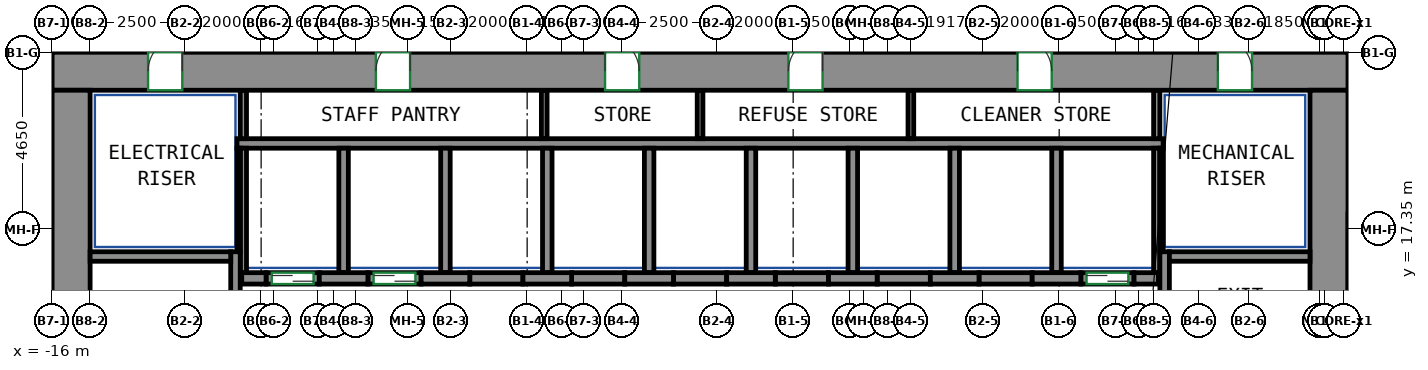
"""IFC4 building model, lengths in metres.
Left out: names, types, materials, properties, quantities, classifications, styles, units other than length and angle.
Written with IfcOpenShell. Run it as: python <this file> out.ifc"""

import sys

from ifc_helpers import new_model, si_unit, direction, frame, frame_2d, origin, place, context, subcontext, project, spatial, rectangle, extrude, source, transform, mapped, element, fill, save


model = new_model("IFC4")
c1 = context("Model", 3, precision=1e-05, world=origin(), true_north=direction((0.0, 1.0)))
c2 = subcontext(c1, "Body", "Model", "MODEL_VIEW")
j1 = project(units=[si_unit("LENGTHUNIT", "METRE"), si_unit("PLANEANGLEUNIT", "RADIAN")], contexts=[c1])
p1 = place(None, origin())
s1 = spatial("IfcSite", under=j1, at=p1, CompositionType="ELEMENT")
p2 = place(p1, origin())
s2 = spatial("IfcBuilding", under=s1, at=p2, CompositionType="ELEMENT")
p3 = place(p2, frame((0.0, 0.0, 43.0)))
s3 = spatial("IfcBuildingStorey", under=s2, at=p3, CompositionType="ELEMENT", Elevation=43.0)
m1 = source(origin(), c2, "Body", "SweptSolid", [
    extrude(rectangle(XDim=34.1, YDim=1.0, at=frame_2d((17.05, 0.0))), origin(), (0.0, 0.0, 1.0), 3.72),
])
p4 = place(p3, frame((-16.0, 21.5, 0.0), z_axis=(0.0, 0.0, 1.0), x_axis=(1.0, 0.0, 0.0)))
e1 = element("IfcWall", 1, at=p4, inside=s3, PredefinedType="SHEAR", context=c2, shape_type="MappedRepresentation", body=[
    mapped(m1, transform((0.0, 0.0, 0.0))),
])
p5 = place(p4, frame((8.52, 0.0, 0.0)))
e2 = element("IfcOpeningElement", 2, at=p5, cuts=e1, PredefinedType="OPENING", context=c2, shape_type="SweptSolid", body=[
    extrude(rectangle(XDim=0.9, YDim=2.1, at=frame_2d((0.45, 1.05))), frame((0.0, 0.51, 0.0), z_axis=(0.0, -1.0, 0.0), x_axis=(1.0, 0.0, 0.0)), (0.0, 0.0, 1.0), 1.02),
])
p6 = place(p4, frame((14.55, 0.0, 0.0)))
e3 = element("IfcOpeningElement", 3, at=p6, cuts=e1, PredefinedType="OPENING", context=c2, shape_type="SweptSolid", body=[
    extrude(rectangle(XDim=0.9, YDim=2.1, at=frame_2d((0.45, 1.05))), frame((0.0, 0.51, 0.0), z_axis=(0.0, -1.0, 0.0), x_axis=(1.0, 0.0, 0.0)), (0.0, 0.0, 1.0), 1.02),
])
p7 = place(p4, frame((19.374, 0.0, 0.0)))
e4 = element("IfcOpeningElement", 4, at=p7, cuts=e1, PredefinedType="OPENING", context=c2, shape_type="SweptSolid", body=[
    extrude(rectangle(XDim=0.9, YDim=2.1, at=frame_2d((0.45, 1.05))), frame((0.0, 0.51, 0.0), z_axis=(0.0, -1.0, 0.0), x_axis=(1.0, 0.0, 0.0)), (0.0, 0.0, 1.0), 1.02),
])
p8 = place(p4, frame((25.404, 0.0, 0.0)))
e5 = element("IfcOpeningElement", 5, at=p8, cuts=e1, PredefinedType="OPENING", context=c2, shape_type="SweptSolid", body=[
    extrude(rectangle(XDim=0.9, YDim=2.1, at=frame_2d((0.45, 1.05))), frame((0.0, 0.51, 0.0), z_axis=(0.0, -1.0, 0.0), x_axis=(1.0, 0.0, 0.0)), (0.0, 0.0, 1.0), 1.02),
])
p9 = place(p4, frame((2.525, 0.0, 0.0)))
e6 = element("IfcOpeningElement", 6, at=p9, cuts=e1, PredefinedType="OPENING", context=c2, shape_type="SweptSolid", body=[
    extrude(rectangle(XDim=0.9, YDim=2.1, at=frame_2d((0.45, 1.05))), frame((0.0, 0.51, 0.0), z_axis=(0.0, -1.0, 0.0), x_axis=(1.0, 0.0, 0.0)), (0.0, 0.0, 1.0), 1.02),
])
p10 = place(p4, frame((30.675, 0.0, 0.0)))
e7 = element("IfcOpeningElement", 7, at=p10, cuts=e1, PredefinedType="OPENING", context=c2, shape_type="SweptSolid", body=[
    extrude(rectangle(XDim=0.9, YDim=2.1, at=frame_2d((0.45, 1.05))), frame((0.0, 0.51, 0.0), z_axis=(0.0, -1.0, 0.0), x_axis=(1.0, 0.0, 0.0)), (0.0, 0.0, 1.0), 1.02),
])
m2 = source(origin(), c2, "Body", "SweptSolid", [
    extrude(rectangle(XDim=12.0, YDim=1.0, at=frame_2d((6.0, 0.0))), origin(), (0.0, 0.0, 1.0), 3.72),
])
for number, where, z_axis, x_axis in (
    (8, (-15.5, 9.0, 0.0), (0.0, 0.0, 1.0), (0.0, 1.0, 0.0)),
    (9, (17.6, 9.0, 0.0), (0.0, 0.0, 1.0), (0.0, 1.0, 0.0)),
):
    element("IfcWall", number, at=place(p3, frame(where, z_axis=z_axis, x_axis=x_axis)), inside=s3, PredefinedType="SHEAR", context=c2, shape_type="MappedRepresentation", body=[
        mapped(m2, transform((0.0, 0.0, 0.0))),
    ])
m3 = source(origin(), c2, "Body", "SweptSolid", [
    extrude(rectangle(XDim=7.75, YDim=0.25, at=frame_2d((3.875, 0.0))), origin(), (0.0, 0.0, 1.0), 3.72),
])
p11 = place(p3, frame((-11.175, 9.0, 0.0), z_axis=(0.0, 0.0, 1.0), x_axis=(0.0, 1.0, 0.0)))
e10 = element("IfcWall", 10, at=p11, inside=s3, PredefinedType="SHEAR", context=c2, shape_type="MappedRepresentation", body=[
    mapped(m3, transform((0.0, 0.0, 0.0))),
])
m4 = source(origin(), c2, "Body", "SweptSolid", [
    extrude(rectangle(XDim=3.7, YDim=0.25, at=frame_2d((1.85, 0.0))), origin(), (0.0, 0.0, 1.0), 3.72),
])
p12 = place(p3, frame((-15.0, 16.625, 0.0), z_axis=(0.0, 0.0, 1.0), x_axis=(1.0, 0.0, 0.0)))
e11 = element("IfcWall", 11, at=p12, inside=s3, PredefinedType="SHEAR", context=c2, shape_type="MappedRepresentation", body=[
    mapped(m4, transform((0.0, 0.0, 0.0))),
])
p13 = place(p3, frame((13.275, 9.0, 0.0), z_axis=(0.0, 0.0, 1.0), x_axis=(0.0, 1.0, 0.0)))
e12 = element("IfcWall", 12, at=p13, inside=s3, PredefinedType="SHEAR", context=c2, shape_type="MappedRepresentation", body=[
    mapped(m3, transform((0.0, 0.0, 0.0))),
])
m5 = source(origin(), c2, "Body", "SweptSolid", [
    extrude(rectangle(XDim=3.7, YDim=0.25, at=frame_2d((1.85, 0.0))), origin(), (0.0, 0.0, 1.0), 3.72),
])
p14 = place(p3, frame((13.4, 16.625, 0.0), z_axis=(0.0, 0.0, 1.0), x_axis=(1.0, 0.0, 0.0)))
e13 = element("IfcWall", 13, at=p14, inside=s3, PredefinedType="SHEAR", context=c2, shape_type="MappedRepresentation", body=[
    mapped(m5, transform((0.0, 0.0, 0.0))),
])
m6 = source(origin(), c2, "Body", "SweptSolid", [
    extrude(rectangle(XDim=0.64, YDim=0.3, at=frame_2d((0.32, 0.0))), origin(), (0.0, 0.0, 1.0), 3.72),
])
p15 = place(p3, frame((-11.01, 16.05, 0.0), z_axis=(0.0, 0.0, 1.0), x_axis=(1.0, 0.0, 0.0)))
e14 = element("IfcWall", 14, at=p15, inside=s3, PredefinedType="SHEAR", context=c2, shape_type="MappedRepresentation", body=[
    mapped(m6, transform((0.0, 0.0, 0.0))),
])
m7 = source(origin(), c2, "Body", "SweptSolid", [
    extrude(rectangle(XDim=1.28, YDim=0.3, at=frame_2d((0.64, 0.0))), origin(), (0.0, 0.0, 1.0), 3.72),
])
for number, where, z_axis, x_axis in (
    (15, (-8.97, 16.05, 0.0), (0.0, 0.0, 1.0), (1.0, 0.0, 0.0)),
    (16, (-6.29, 16.05, 0.0), (0.0, 0.0, 1.0), (1.0, 0.0, 0.0)),
    (17, (-3.61, 16.05, 0.0), (0.0, 0.0, 1.0), (1.0, 0.0, 0.0)),
    (18, (-0.93, 16.05, 0.0), (0.0, 0.0, 1.0), (1.0, 0.0, 0.0)),
    (19, (1.75, 16.05, 0.0), (0.0, 0.0, 1.0), (1.0, 0.0, 0.0)),
    (20, (4.43, 16.05, 0.0), (0.0, 0.0, 1.0), (1.0, 0.0, 0.0)),
):
    element("IfcWall", number, at=place(p3, frame(where, z_axis=z_axis, x_axis=x_axis)), inside=s3, PredefinedType="SHEAR", context=c2, shape_type="MappedRepresentation", body=[
        mapped(m7, transform((0.0, 0.0, 0.0))),
    ])
m8 = source(origin(), c2, "Body", "SweptSolid", [
    extrude(rectangle(XDim=1.28, YDim=0.3, at=frame_2d((0.64, 0.0))), origin(), (0.0, 0.0, 1.0), 3.72),
])
p16 = place(p3, frame((7.11, 16.05, 0.0), z_axis=(0.0, 0.0, 1.0), x_axis=(1.0, 0.0, 0.0)))
e21 = element("IfcWall", 21, at=p16, inside=s3, PredefinedType="SHEAR", context=c2, shape_type="MappedRepresentation", body=[
    mapped(m8, transform((0.0, 0.0, 0.0))),
])
p17 = place(p3, frame((9.79, 16.05, 0.0), z_axis=(0.0, 0.0, 1.0), x_axis=(1.0, 0.0, 0.0)))
e22 = element("IfcWall", 22, at=p17, inside=s3, PredefinedType="SHEAR", context=c2, shape_type="MappedRepresentation", body=[
    mapped(m7, transform((0.0, 0.0, 0.0))),
])
m9 = source(origin(), c2, "Body", "SweptSolid", [
    extrude(rectangle(XDim=0.64, YDim=0.3, at=frame_2d((0.32, 0.0))), origin(), (0.0, 0.0, 1.0), 3.72),
])
p18 = place(p3, frame((12.47, 16.05, 0.0), z_axis=(0.0, 0.0, 1.0), x_axis=(1.0, 0.0, 0.0)))
e23 = element("IfcWall", 23, at=p18, inside=s3, PredefinedType="SHEAR", context=c2, shape_type="MappedRepresentation", body=[
    mapped(m9, transform((0.0, 0.0, 0.0))),
])
m10 = source(origin(), c2, "Body", "SweptSolid", [
    extrude(rectangle(XDim=1.4, YDim=0.3, at=frame_2d((0.7, 0.0))), origin(), (0.0, 0.0, 1.0), 3.72),
])
p19 = place(p3, frame((11.07, 16.05, 0.0), z_axis=(0.0, 0.0, 1.0), x_axis=(1.0, 0.0, 0.0)))
e24 = element("IfcWall", 24, at=p19, inside=s3, PredefinedType="PARTITIONING", context=c2, shape_type="MappedRepresentation", body=[
    mapped(m10, transform((0.0, 0.0, 0.0))),
])
p20 = place(p19, frame((0.15, 0.0, 0.0)))
e25 = element("IfcOpeningElement", 25, at=p20, cuts=e24, PredefinedType="OPENING", context=c2, shape_type="SweptSolid", body=[
    extrude(rectangle(XDim=1.1, YDim=2.1, at=frame_2d((0.55, 1.05))), frame((0.0, 0.16, 0.0), z_axis=(0.0, -1.0, 0.0), x_axis=(1.0, 0.0, 0.0)), (0.0, 0.0, 1.0), 0.32),
])
m11 = source(origin(), c2, "Body", "SweptSolid", [
    extrude(rectangle(XDim=1.4, YDim=0.3, at=frame_2d((0.7, 0.0))), origin(), (0.0, 0.0, 1.0), 3.72),
])
p21 = place(p3, frame((-10.37, 16.05, 0.0), z_axis=(0.0, 0.0, 1.0), x_axis=(1.0, 0.0, 0.0)))
e26 = element("IfcWall", 26, at=p21, inside=s3, PredefinedType="PARTITIONING", context=c2, shape_type="MappedRepresentation", body=[
    mapped(m11, transform((0.0, 0.0, 0.0))),
])
p22 = place(p21, frame((0.15, 0.0, 0.0)))
e27 = element("IfcOpeningElement", 27, at=p22, cuts=e26, PredefinedType="OPENING", context=c2, shape_type="SweptSolid", body=[
    extrude(rectangle(XDim=1.1, YDim=2.1, at=frame_2d((0.55, 1.05))), frame((0.0, 0.16, 0.0), z_axis=(0.0, -1.0, 0.0), x_axis=(1.0, 0.0, 0.0)), (0.0, 0.0, 1.0), 0.32),
])
p23 = place(p3, frame((-7.69, 16.05, 0.0), z_axis=(0.0, 0.0, 1.0), x_axis=(1.0, 0.0, 0.0)))
e28 = element("IfcWall", 28, at=p23, inside=s3, PredefinedType="PARTITIONING", context=c2, shape_type="MappedRepresentation", body=[
    mapped(m10, transform((0.0, 0.0, 0.0))),
])
p24 = place(p23, frame((0.15, 0.0, 0.0)))
e29 = element("IfcOpeningElement", 29, at=p24, cuts=e28, PredefinedType="OPENING", context=c2, shape_type="SweptSolid", body=[
    extrude(rectangle(XDim=1.1, YDim=2.1, at=frame_2d((0.55, 1.05))), frame((0.0, 0.16, 0.0), z_axis=(0.0, -1.0, 0.0), x_axis=(1.0, 0.0, 0.0)), (0.0, 0.0, 1.0), 0.32),
])
p25 = place(p3, frame((-5.01, 16.05, 0.0), z_axis=(0.0, 0.0, 1.0), x_axis=(1.0, 0.0, 0.0)))
e30 = element("IfcWall", 30, at=p25, inside=s3, PredefinedType="PARTITIONING", context=c2, shape_type="MappedRepresentation", body=[
    mapped(m10, transform((0.0, 0.0, 0.0))),
])
p26 = place(p3, frame((-2.33, 16.05, 0.0), z_axis=(0.0, 0.0, 1.0), x_axis=(1.0, 0.0, 0.0)))
e31 = element("IfcWall", 31, at=p26, inside=s3, PredefinedType="PARTITIONING", context=c2, shape_type="MappedRepresentation", body=[
    mapped(m11, transform((0.0, 0.0, 0.0))),
])
for number, where, z_axis, x_axis in (
    (32, (0.35, 16.05, 0.0), (0.0, 0.0, 1.0), (1.0, 0.0, 0.0)),
    (33, (3.03, 16.05, 0.0), (0.0, 0.0, 1.0), (1.0, 0.0, 0.0)),
):
    element("IfcWall", number, at=place(p3, frame(where, z_axis=z_axis, x_axis=x_axis)), inside=s3, PredefinedType="PARTITIONING", context=c2, shape_type="MappedRepresentation", body=[
        mapped(m10, transform((0.0, 0.0, 0.0))),
    ])
for number, where, z_axis, x_axis in (
    (34, (5.71, 16.05, 0.0), (0.0, 0.0, 1.0), (1.0, 0.0, 0.0)),
    (35, (8.39, 16.05, 0.0), (0.0, 0.0, 1.0), (1.0, 0.0, 0.0)),
):
    element("IfcWall", number, at=place(p3, frame(where, z_axis=z_axis, x_axis=x_axis)), inside=s3, PredefinedType="PARTITIONING", context=c2, shape_type="MappedRepresentation", body=[
        mapped(m11, transform((0.0, 0.0, 0.0))),
    ])
m12 = source(origin(), c2, "Body", "SweptSolid", [
    extrude(rectangle(XDim=24.37, YDim=0.25, at=frame_2d((12.185, 0.0))), origin(), (0.0, 0.0, 1.0), 3.72),
])
p27 = place(p3, frame((-11.135, 19.6, 0.0), z_axis=(0.0, 0.0, 1.0), x_axis=(1.0, 0.0, 0.0)))
e36 = element("IfcWall", 36, at=p27, inside=s3, PredefinedType="PARTITIONING", context=c2, shape_type="MappedRepresentation", body=[
    mapped(m12, transform((0.0, 0.0, 0.0))),
])
m13 = source(origin(), c2, "Body", "SweptSolid", [
    extrude(rectangle(XDim=3.275, YDim=0.165, at=frame_2d((1.638, 0.0))), origin(), (0.0, 0.0, 1.0), 3.72),
])
p28 = place(p3, frame((13.067, 16.2, 0.0), z_axis=(0.0, 0.0, 1.0), x_axis=(0.0, 1.0, 0.0)))
e37 = element("IfcWall", 37, at=p28, inside=s3, PredefinedType="PARTITIONING", context=c2, shape_type="MappedRepresentation", body=[
    mapped(m13, transform((0.0, 0.0, 0.0))),
])
m14 = source(origin(), c2, "Body", "SweptSolid", [
    extrude(rectangle(XDim=1.275, YDim=0.165, at=frame_2d((0.637, 0.0))), origin(), (0.0, 0.0, 1.0), 3.72),
])
p29 = place(p3, frame((13.067, 19.725, 0.0), z_axis=(0.0, 0.0, 1.0), x_axis=(0.0, 1.0, 0.0)))
e38 = element("IfcWall", 38, at=p29, inside=s3, PredefinedType="PARTITIONING", context=c2, shape_type="MappedRepresentation", body=[
    mapped(m14, transform((0.0, 0.0, 0.0))),
])
p30 = place(p3, frame((-10.968, 16.2, 0.0), z_axis=(0.0, 0.0, 1.0), x_axis=(0.0, 1.0, 0.0)))
e39 = element("IfcWall", 39, at=p30, inside=s3, PredefinedType="PARTITIONING", context=c2, shape_type="MappedRepresentation", body=[
    mapped(m13, transform((0.0, 0.0, 0.0))),
])
p31 = place(p3, frame((-10.968, 19.725, 0.0), z_axis=(0.0, 0.0, 1.0), x_axis=(0.0, 1.0, 0.0)))
e40 = element("IfcWall", 40, at=p31, inside=s3, PredefinedType="PARTITIONING", context=c2, shape_type="MappedRepresentation", body=[
    mapped(m14, transform((0.0, 0.0, 0.0))),
])
m15 = source(origin(), c2, "Body", "SweptSolid", [
    extrude(rectangle(XDim=3.275, YDim=0.25, at=frame_2d((1.638, 0.0))), origin(), (0.0, 0.0, 1.0), 3.72),
])
p32 = place(p3, frame((10.43, 16.2, 0.0), z_axis=(0.0, 0.0, 1.0), x_axis=(0.0, 1.0, 0.0)))
e41 = element("IfcWall", 41, at=p32, inside=s3, PredefinedType="PARTITIONING", context=c2, shape_type="MappedRepresentation", body=[
    mapped(m15, transform((0.0, 0.0, 0.0))),
])
m16 = source(origin(), c2, "Body", "SweptSolid", [
    extrude(rectangle(XDim=2.725, YDim=0.085, at=frame_2d((1.363, 0.0))), origin(), (0.0, 0.0, 1.0), 3.72),
])
p33 = place(p3, frame((13.192, 16.75, 0.0), z_axis=(0.0, 0.0, 1.0), x_axis=(0.0, 1.0, 0.0)))
e42 = element("IfcWall", 42, at=p33, inside=s3, PredefinedType="PARTITIONING", context=c2, shape_type="MappedRepresentation", body=[
    mapped(m16, transform((0.0, 0.0, 0.0))),
])
for number, where, z_axis, x_axis in (
    (43, (2.39, 16.2, 0.0), (0.0, 0.0, 1.0), (0.0, 1.0, 0.0)),
    (44, (5.07, 16.2, 0.0), (0.0, 0.0, 1.0), (0.0, 1.0, 0.0)),
    (45, (7.75, 16.2, 0.0), (0.0, 0.0, 1.0), (0.0, 1.0, 0.0)),
    (46, (-0.29, 16.2, 0.0), (0.0, 0.0, 1.0), (0.0, 1.0, 0.0)),
):
    element("IfcWall", number, at=place(p3, frame(where, z_axis=z_axis, x_axis=x_axis)), inside=s3, PredefinedType="PARTITIONING", context=c2, shape_type="MappedRepresentation", body=[
        mapped(m15, transform((0.0, 0.0, 0.0))),
    ])
p34 = place(p3, frame((-11.093, 16.75, 0.0), z_axis=(0.0, 0.0, 1.0), x_axis=(0.0, 1.0, 0.0)))
e47 = element("IfcWall", 47, at=p34, inside=s3, PredefinedType="PARTITIONING", context=c2, shape_type="MappedRepresentation", body=[
    mapped(m16, transform((0.0, 0.0, 0.0))),
])
for number, where, z_axis, x_axis in (
    (48, (-2.97, 16.2, 0.0), (0.0, 0.0, 1.0), (0.0, 1.0, 0.0)),
    (49, (-5.65, 16.2, 0.0), (0.0, 0.0, 1.0), (0.0, 1.0, 0.0)),
    (50, (-8.33, 16.2, 0.0), (0.0, 0.0, 1.0), (0.0, 1.0, 0.0)),
):
    element("IfcWall", number, at=place(p3, frame(where, z_axis=z_axis, x_axis=x_axis)), inside=s3, PredefinedType="PARTITIONING", context=c2, shape_type="MappedRepresentation", body=[
        mapped(m15, transform((0.0, 0.0, 0.0))),
    ])
m17 = source(origin(), c2, "Body", "SweptSolid", [
    extrude(rectangle(XDim=1.275, YDim=0.15, at=frame_2d((0.637, 0.0))), origin(), (0.0, 0.0, 1.0), 3.72),
])
for number, where, z_axis, x_axis in (
    (51, (-3.05, 19.725, 0.0), (0.0, 0.0, 1.0), (0.0, 1.0, 0.0)),
    (52, (1.05, 19.725, 0.0), (0.0, 0.0, 1.0), (0.0, 1.0, 0.0)),
    (53, (6.598, 19.725, 0.0), (0.0, 0.0, 1.0), (0.0, 1.0, 0.0)),
):
    element("IfcWall", number, at=place(p3, frame(where, z_axis=z_axis, x_axis=x_axis)), inside=s3, PredefinedType="PARTITIONING", context=c2, shape_type="MappedRepresentation", body=[
        mapped(m17, transform((0.0, 0.0, 0.0))),
    ])
p35 = place(p20, origin())
e54 = element("IfcDoor", 54, at=p35, inside=s3, OperationType="DOUBLE_DOOR_SLIDING", PredefinedType="DOOR", context=c2, shape_type="SweptSolid", body=[
    extrude(rectangle(XDim=1.1, YDim=2.1, at=frame_2d((0.55, 1.05))), frame((0.0, 0.025, 0.0), z_axis=(0.0, -1.0, 0.0), x_axis=(1.0, 0.0, 0.0)), (0.0, 0.0, 1.0), 0.05),
])
fill(e25, e54)
p36 = place(p22, origin())
e55 = element("IfcDoor", 55, at=p36, inside=s3, OperationType="DOUBLE_DOOR_SLIDING", PredefinedType="DOOR", context=c2, shape_type="SweptSolid", body=[
    extrude(rectangle(XDim=1.1, YDim=2.1, at=frame_2d((0.55, 1.05))), frame((0.0, 0.025, 0.0), z_axis=(0.0, -1.0, 0.0), x_axis=(1.0, 0.0, 0.0)), (0.0, 0.0, 1.0), 0.05),
])
fill(e27, e55)
p37 = place(p24, origin())
e56 = element("IfcDoor", 56, at=p37, inside=s3, OperationType="DOUBLE_DOOR_SLIDING", PredefinedType="DOOR", context=c2, shape_type="SweptSolid", body=[
    extrude(rectangle(XDim=1.1, YDim=2.1, at=frame_2d((0.55, 1.05))), frame((0.0, 0.025, 0.0), z_axis=(0.0, -1.0, 0.0), x_axis=(1.0, 0.0, 0.0)), (0.0, 0.0, 1.0), 0.05),
])
fill(e29, e56)
p38 = place(p5, origin())
e57 = element("IfcDoor", 57, at=p38, inside=s3, OperationType="SINGLE_SWING_RIGHT", PredefinedType="DOOR", context=c2, shape_type="SweptSolid", body=[
    extrude(rectangle(XDim=0.9, YDim=2.1, at=frame_2d((0.45, 1.05))), frame((0.0, -0.355, 0.0), z_axis=(0.0, -1.0, 0.0), x_axis=(1.0, 0.0, 0.0)), (0.0, 0.0, 1.0), 0.05),
])
fill(e2, e57)
p39 = place(p6, origin())
e58 = element("IfcDoor", 58, at=p39, inside=s3, OperationType="SINGLE_SWING_LEFT", PredefinedType="DOOR", context=c2, shape_type="SweptSolid", body=[
    extrude(rectangle(XDim=0.9, YDim=2.1, at=frame_2d((0.45, 1.05))), frame((0.0, -0.355, 0.0), z_axis=(0.0, -1.0, 0.0), x_axis=(1.0, 0.0, 0.0)), (0.0, 0.0, 1.0), 0.05),
])
fill(e3, e58)
p40 = place(p7, origin())
e59 = element("IfcDoor", 59, at=p40, inside=s3, OperationType="SINGLE_SWING_RIGHT", PredefinedType="DOOR", context=c2, shape_type="SweptSolid", body=[
    extrude(rectangle(XDim=0.9, YDim=2.1, at=frame_2d((0.45, 1.05))), frame((0.0, -0.355, 0.0), z_axis=(0.0, -1.0, 0.0), x_axis=(1.0, 0.0, 0.0)), (0.0, 0.0, 1.0), 0.05),
])
fill(e4, e59)
p41 = place(p8, origin())
e60 = element("IfcDoor", 60, at=p41, inside=s3, OperationType="SINGLE_SWING_LEFT", PredefinedType="DOOR", context=c2, shape_type="SweptSolid", body=[
    extrude(rectangle(XDim=0.9, YDim=2.1, at=frame_2d((0.45, 1.05))), frame((0.0, -0.355, 0.0), z_axis=(0.0, -1.0, 0.0), x_axis=(1.0, 0.0, 0.0)), (0.0, 0.0, 1.0), 0.05),
])
fill(e5, e60)
p42 = place(p9, origin())
e61 = element("IfcDoor", 61, at=p42, inside=s3, OperationType="SINGLE_SWING_RIGHT", PredefinedType="DOOR", context=c2, shape_type="SweptSolid", body=[
    extrude(rectangle(XDim=0.9, YDim=2.1, at=frame_2d((0.45, 1.05))), frame((0.0, -0.355, 0.0), z_axis=(0.0, -1.0, 0.0), x_axis=(1.0, 0.0, 0.0)), (0.0, 0.0, 1.0), 0.05),
])
fill(e6, e61)
p43 = place(p10, origin())
e62 = element("IfcDoor", 62, at=p43, inside=s3, OperationType="SINGLE_SWING_LEFT", PredefinedType="DOOR", context=c2, shape_type="SweptSolid", body=[
    extrude(rectangle(XDim=0.9, YDim=2.1, at=frame_2d((0.45, 1.05))), frame((0.0, -0.355, 0.0), z_axis=(0.0, -1.0, 0.0), x_axis=(1.0, 0.0, 0.0)), (0.0, 0.0, 1.0), 0.05),
])
fill(e7, e62)
save(model, sys.argv[1])
